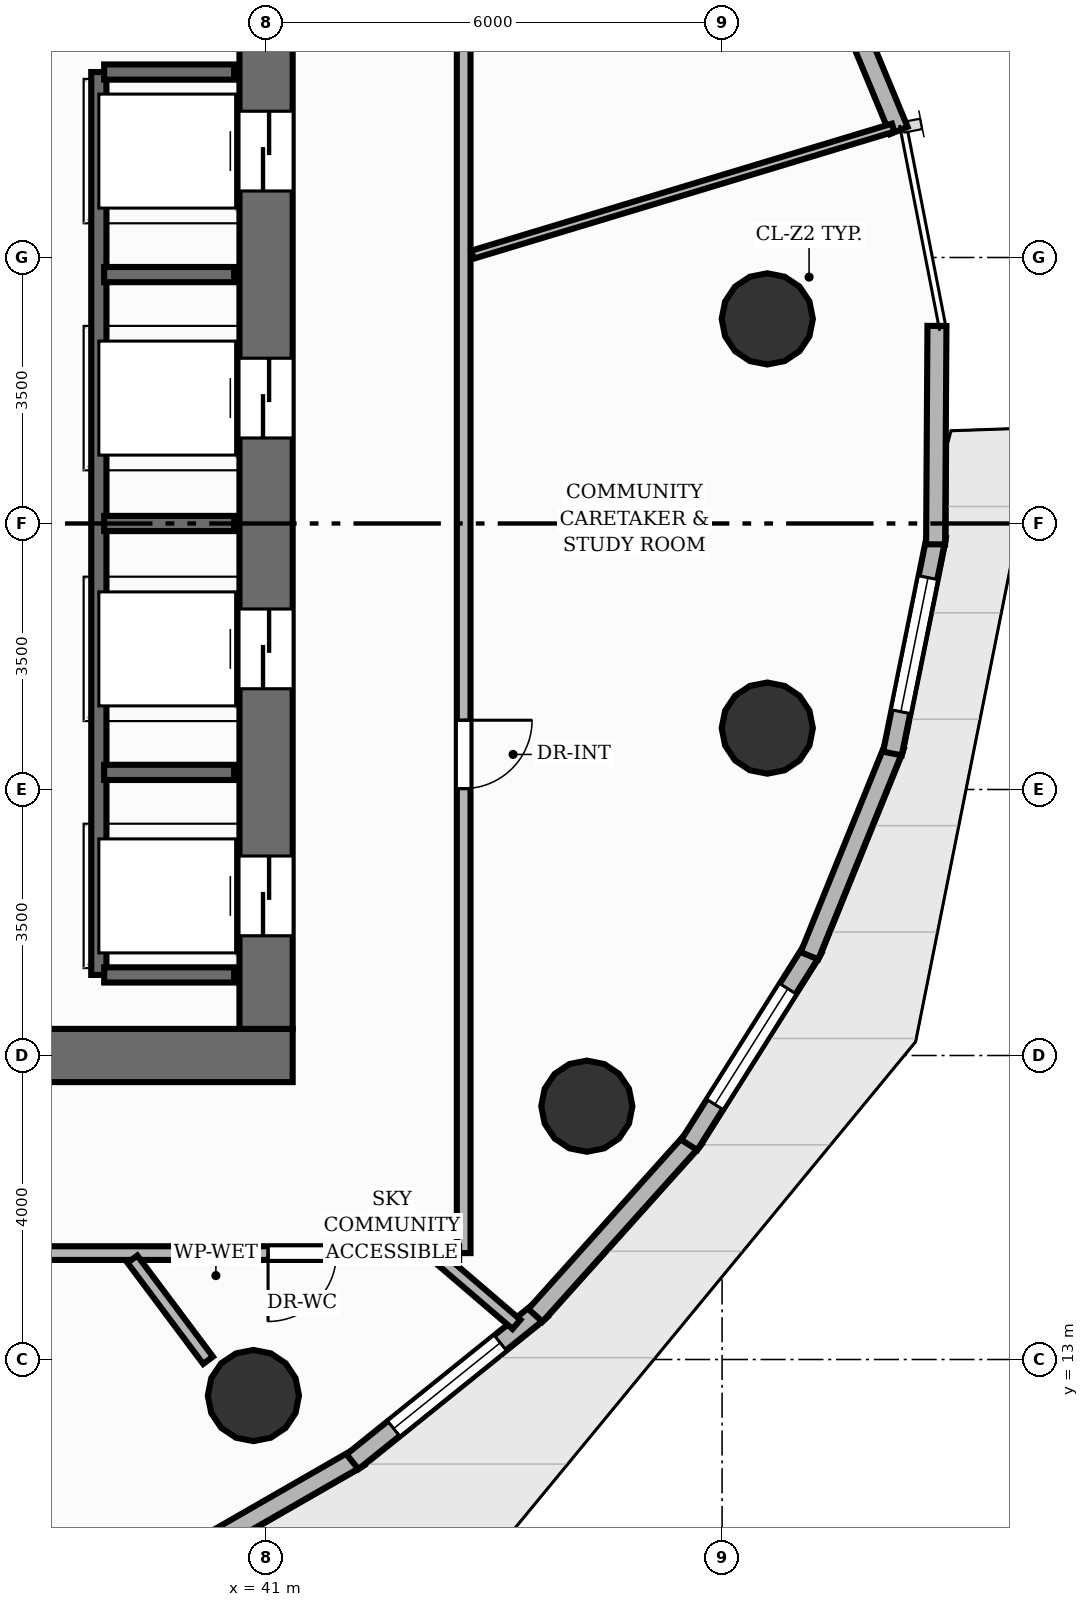
"""IFC4 building model, lengths in metres.
Left out: names, types, materials, properties, quantities, classifications, styles, units other than length and angle.
Written with IfcOpenShell. Run it as: python <this file> out.ifc"""

import sys

from ifc_helpers import new_model, si_unit, direction, frame, frame_2d, origin, origin_2d, place, context, subcontext, project, spatial, rectangle, circle, extrude, element, fill, save


model = new_model("IFC4")
c1 = context("Model", 3, precision=1e-05, world=origin(), true_north=direction((0.0, 1.0)))
c2 = subcontext(c1, "Body", "Model", "MODEL_VIEW")
j1 = project(units=[si_unit("LENGTHUNIT", "METRE"), si_unit("PLANEANGLEUNIT", "RADIAN")], contexts=[c1])
p1 = place(None, origin())
s1 = spatial("IfcSite", under=j1, at=p1, CompositionType="ELEMENT")
p2 = place(p1, origin())
s2 = spatial("IfcBuilding", under=s1, at=p2, CompositionType="ELEMENT")
p3 = place(p2, frame((0.0, 0.0, 70.88)))
s3 = spatial("IfcBuildingStorey", under=s2, at=p3, CompositionType="ELEMENT", Elevation=70.88)
p4 = place(p3, frame((22.65, 17.0, 0.0), z_axis=(0.0, 0.0, 1.0), x_axis=(1.0, 0.0, 0.0)))
e1 = element("IfcWall", 1, at=p4, inside=s3, PredefinedType="SHEAR", context=c2, shape_type="SweptSolid", body=[
    extrude(rectangle(XDim=18.7, YDim=0.7, at=frame_2d((9.35, 0.0))), origin(), (0.0, 0.0, 1.0), 3.2),
])
p5 = place(p4, frame((5.85, 0.0, 0.0)))
e2 = element("IfcOpeningElement", 2, at=p5, cuts=e1, PredefinedType="OPENING", context=c2, shape_type="SweptSolid", body=[
    extrude(rectangle(XDim=1.1, YDim=2.15, at=frame_2d((0.55, 1.075))), frame((0.0, 0.36, 0.0), z_axis=(0.0, -1.0, 0.0), x_axis=(1.0, 0.0, 0.0)), (0.0, 0.0, 1.0), 0.72),
])
p6 = place(p4, frame((9.4, 0.0, 0.0)))
e3 = element("IfcOpeningElement", 3, at=p6, cuts=e1, PredefinedType="OPENING", context=c2, shape_type="SweptSolid", body=[
    extrude(rectangle(XDim=0.9, YDim=2.1, at=frame_2d((0.45, 1.05))), frame((0.0, 0.36, 0.0), z_axis=(0.0, -1.0, 0.0), x_axis=(1.0, 0.0, 0.0)), (0.0, 0.0, 1.0), 0.72),
])
p7 = place(p3, frame((41.0, 17.35, 0.0), z_axis=(0.0, 0.0, 1.0), x_axis=(0.0, 1.0, 0.0)))
e4 = element("IfcWall", 4, at=p7, inside=s3, PredefinedType="SHEAR", context=c2, shape_type="SweptSolid", body=[
    extrude(rectangle(XDim=13.3, YDim=0.7, at=frame_2d((6.65, 0.0))), origin(), (0.0, 0.0, 1.0), 3.2),
])
p8 = place(p7, frame((1.225, 0.0, 0.0)))
e5 = element("IfcOpeningElement", 5, at=p8, cuts=e4, PredefinedType="OPENING", context=c2, shape_type="SweptSolid", body=[
    extrude(rectangle(XDim=1.05, YDim=2.15, at=frame_2d((0.525, 1.075))), frame((0.0, 0.36, 0.0), z_axis=(0.0, -1.0, 0.0), x_axis=(1.0, 0.0, 0.0)), (0.0, 0.0, 1.0), 0.72),
])
p9 = place(p7, frame((4.475, 0.0, 0.0)))
e6 = element("IfcOpeningElement", 6, at=p9, cuts=e4, PredefinedType="OPENING", context=c2, shape_type="SweptSolid", body=[
    extrude(rectangle(XDim=1.05, YDim=2.15, at=frame_2d((0.525, 1.075))), frame((0.0, 0.36, 0.0), z_axis=(0.0, -1.0, 0.0), x_axis=(1.0, 0.0, 0.0)), (0.0, 0.0, 1.0), 0.72),
])
p10 = place(p7, frame((7.775, 0.0, 0.0)))
e7 = element("IfcOpeningElement", 7, at=p10, cuts=e4, PredefinedType="OPENING", context=c2, shape_type="SweptSolid", body=[
    extrude(rectangle(XDim=1.05, YDim=2.15, at=frame_2d((0.525, 1.075))), frame((0.0, 0.36, 0.0), z_axis=(0.0, -1.0, 0.0), x_axis=(1.0, 0.0, 0.0)), (0.0, 0.0, 1.0), 0.72),
])
p11 = place(p7, frame((11.025, 0.0, 0.0)))
e8 = element("IfcOpeningElement", 8, at=p11, cuts=e4, PredefinedType="OPENING", context=c2, shape_type="SweptSolid", body=[
    extrude(rectangle(XDim=1.05, YDim=2.15, at=frame_2d((0.525, 1.075))), frame((0.0, 0.36, 0.0), z_axis=(0.0, -1.0, 0.0), x_axis=(1.0, 0.0, 0.0)), (0.0, 0.0, 1.0), 0.72),
])
for number, where, z_axis, x_axis in (
    (9, (47.594, 26.692, 0.0), (0.0, 0.0, 1.0), (1.0, 0.0, 0.0)),
    (10, (40.833, 12.526, 0.0), (0.0, 0.0, 1.0), (1.0, 0.0, 0.0)),
    (11, (45.22, 16.333, 0.0), (0.0, 0.0, 1.0), (1.0, 0.0, 0.0)),
    (12, (47.594, 21.308, 0.0), (0.0, 0.0, 1.0), (1.0, 0.0, 0.0)),
):
    element("IfcColumn", number, at=place(p3, frame(where, z_axis=z_axis, x_axis=x_axis)), inside=s3, PredefinedType="COLUMN", context=c2, shape_type="SweptSolid", body=[
        extrude(circle(Radius=0.6, at=origin_2d()), origin(), (0.0, 0.0, 1.0), 3.2),
    ])
p12 = place(p3, frame((48.233, 31.801, 0.0), z_axis=(0.0, 0.0, 1.0), x_axis=(0.383525326811, -0.923530358838, 0.0)))
e13 = element("IfcWall", 13, at=p12, inside=s3, PredefinedType="SOLIDWALL", context=c2, shape_type="SweptSolid", body=[
    extrude(rectangle(XDim=2.847, YDim=0.25, at=frame_2d((1.424, 0.0))), origin(), (0.0, 0.0, 1.0), 2.96),
])
p13 = place(p3, frame((42.227, 11.717, 0.0), z_axis=(0.0, 0.0, 1.0), x_axis=(-0.866935640597, -0.498420098975, 0.0)))
e14 = element("IfcWall", 14, at=p13, inside=s3, PredefinedType="SOLIDWALL", context=c2, shape_type="SweptSolid", body=[
    extrude(rectangle(XDim=3.236, YDim=0.25, at=frame_2d((1.618, 0.0))), origin(), (0.0, 0.0, 1.0), 2.96),
])
p14 = place(p3, frame((44.623, 13.656, 0.0), z_axis=(0.0, 0.0, 1.0), x_axis=(-0.778932404301, -0.627107893054, 0.0)))
e15 = element("IfcWall", 15, at=p14, inside=s3, PredefinedType="SOLIDWALL", context=c2, shape_type="SweptSolid", body=[
    extrude(rectangle(XDim=3.192, YDim=0.25, at=frame_2d((1.596, 0.0))), origin(), (0.0, 0.0, 1.0), 2.96),
])
p15 = place(p14, frame((0.696, 0.0, 0.85)))
e16 = element("IfcOpeningElement", 16, at=p15, cuts=e15, PredefinedType="OPENING", context=c2, shape_type="SweptSolid", body=[
    extrude(rectangle(XDim=1.8, YDim=2.0, at=frame_2d((0.9, 1.0))), frame((0.0, 0.135, 0.0), z_axis=(0.0, -1.0, 0.0), x_axis=(1.0, 0.0, 0.0)), (0.0, 0.0, 1.0), 0.27),
])
p16 = place(p3, frame((46.635, 15.911, 0.0), z_axis=(0.0, 0.0, 1.0), x_axis=(-0.66790863438, -0.744243277511, 0.0)))
e17 = element("IfcWall", 17, at=p16, inside=s3, PredefinedType="SOLIDWALL", context=c2, shape_type="SweptSolid", body=[
    extrude(rectangle(XDim=3.131, YDim=0.25, at=frame_2d((1.565, 0.0))), origin(), (0.0, 0.0, 1.0), 2.96),
])
p17 = place(p3, frame((48.201, 18.412, 0.0), z_axis=(0.0, 0.0, 1.0), x_axis=(-0.533407635949, -0.845858317871, 0.0)))
e18 = element("IfcWall", 18, at=p17, inside=s3, PredefinedType="SOLIDWALL", context=c2, shape_type="SweptSolid", body=[
    extrude(rectangle(XDim=3.061, YDim=0.25, at=frame_2d((1.53, 0.0))), origin(), (0.0, 0.0, 1.0), 2.96),
])
p18 = place(p17, frame((0.63, 0.0, 0.85)))
e19 = element("IfcOpeningElement", 19, at=p18, cuts=e18, PredefinedType="OPENING", context=c2, shape_type="SweptSolid", body=[
    extrude(rectangle(XDim=1.8, YDim=2.0, at=frame_2d((0.9, 1.0))), frame((0.0, 0.135, 0.0), z_axis=(0.0, -1.0, 0.0), x_axis=(1.0, 0.0, 0.0)), (0.0, 0.0, 1.0), 0.27),
])
p19 = place(p3, frame((49.273, 21.082, 0.0), z_axis=(0.0, 0.0, 1.0), x_axis=(-0.376048320415, -0.926600054345, 0.0)))
e20 = element("IfcWall", 20, at=p19, inside=s3, PredefinedType="SOLIDWALL", context=c2, shape_type="SweptSolid", body=[
    extrude(rectangle(XDim=2.988, YDim=0.25, at=frame_2d((1.494, 0.0))), origin(), (0.0, 0.0, 1.0), 2.96),
])
p20 = place(p3, frame((49.821, 23.839, 0.0), z_axis=(0.0, 0.0, 1.0), x_axis=(-0.198331811595, -0.980134935868, 0.0)))
e21 = element("IfcWall", 21, at=p20, inside=s3, PredefinedType="SOLIDWALL", context=c2, shape_type="SweptSolid", body=[
    extrude(rectangle(XDim=2.924, YDim=0.25, at=frame_2d((1.462, 0.0))), origin(), (0.0, 0.0, 1.0), 2.96),
])
p21 = place(p20, frame((0.562, 0.0, 0.85)))
e22 = element("IfcOpeningElement", 22, at=p21, cuts=e21, PredefinedType="OPENING", context=c2, shape_type="SweptSolid", body=[
    extrude(rectangle(XDim=1.8, YDim=2.0, at=frame_2d((0.9, 1.0))), frame((0.0, 0.135, 0.0), z_axis=(0.0, -1.0, 0.0), x_axis=(1.0, 0.0, 0.0)), (0.0, 0.0, 1.0), 0.27),
])
p22 = place(p3, frame((49.827, 26.6, 0.0), z_axis=(0.0, 0.0, 1.0), x_axis=(-0.006201036057, -0.999980773391, 0.0)))
e23 = element("IfcWall", 23, at=p22, inside=s3, PredefinedType="SOLIDWALL", context=c2, shape_type="SweptSolid", body=[
    extrude(rectangle(XDim=2.874, YDim=0.25, at=frame_2d((1.437, 0.0))), origin(), (0.0, 0.0, 1.0), 2.96),
])
p23 = place(p3, frame((38.8, 18.06, 0.0), z_axis=(0.0, 0.0, 1.0), x_axis=(0.0, 1.0, 0.0)))
e24 = element("IfcWall", 24, at=p23, inside=s3, PredefinedType="SHEAR", context=c2, shape_type="SweptSolid", body=[
    extrude(rectangle(XDim=11.88, YDim=0.2, at=frame_2d((5.94, 0.0))), origin(), (0.0, 0.0, 1.0), 3.2),
])
for number, where, z_axis, x_axis in (
    (25, (38.87, 18.06, 0.0), (0.0, 0.0, 1.0), (1.0, 0.0, 0.0)),
    (26, (38.87, 29.94, 0.0), (0.0, 0.0, 1.0), (1.0, 0.0, 0.0)),
    (27, (38.87, 20.725, 0.0), (0.0, 0.0, 1.0), (1.0, 0.0, 0.0)),
    (28, (38.87, 24.0, 0.0), (0.0, 0.0, 1.0), (1.0, 0.0, 0.0)),
    (29, (38.87, 27.275, 0.0), (0.0, 0.0, 1.0), (1.0, 0.0, 0.0)),
):
    element("IfcWall", number, at=place(p3, frame(where, z_axis=z_axis, x_axis=x_axis)), inside=s3, PredefinedType="SHEAR", context=c2, shape_type="SweptSolid", body=[
        extrude(rectangle(XDim=1.71, YDim=0.2, at=frame_2d((0.855, 0.0))), origin(), (0.0, 0.0, 1.0), 3.2),
    ])
p24 = place(p3, frame((43.6, 33.54, 0.0), z_axis=(0.0, 0.0, 1.0), x_axis=(0.0, -1.0, 0.0)))
e30 = element("IfcWall", 30, at=p24, inside=s3, PredefinedType="PARTITIONING", context=c2, shape_type="SweptSolid", body=[
    extrude(rectangle(XDim=19.14, YDim=0.18, at=frame_2d((9.57, 0.0))), origin(), (0.0, 0.0, 1.0), 2.955),
])
p25 = place(p24, frame((12.128, 0.0, 0.0)))
e31 = element("IfcOpeningElement", 31, at=p25, cuts=e30, PredefinedType="OPENING", context=c2, shape_type="SweptSolid", body=[
    extrude(rectangle(XDim=0.9, YDim=2.1, at=frame_2d((0.45, 1.05))), frame((0.0, 0.1, 0.0), z_axis=(0.0, -1.0, 0.0), x_axis=(1.0, 0.0, 0.0)), (0.0, 0.0, 1.0), 0.2),
])
p26 = place(p3, frame((43.231, 14.4, 0.0), z_axis=(0.0, 0.0, 1.0), x_axis=(-1.0, 0.0, 0.0)))
e32 = element("IfcWall", 32, at=p26, inside=s3, PredefinedType="PARTITIONING", context=c2, shape_type="SweptSolid", body=[
    extrude(rectangle(XDim=22.771, YDim=0.18, at=frame_2d((11.386, 0.0))), origin(), (0.0, 0.0, 1.0), 2.955),
])
p27 = place(p26, frame((10.968, 0.0, 0.0)))
e33 = element("IfcOpeningElement", 33, at=p27, cuts=e32, PredefinedType="OPENING", context=c2, shape_type="SweptSolid", body=[
    extrude(rectangle(XDim=0.9, YDim=2.1, at=frame_2d((0.45, 1.05))), frame((0.0, 0.1, 0.0), z_axis=(0.0, -1.0, 0.0), x_axis=(1.0, 0.0, 0.0)), (0.0, 0.0, 1.0), 0.2),
])
p28 = place(p26, frame((1.305, 0.0, 0.0)))
e34 = element("IfcOpeningElement", 34, at=p28, cuts=e32, PredefinedType="OPENING", context=c2, shape_type="SweptSolid", body=[
    extrude(rectangle(XDim=0.9, YDim=2.1, at=frame_2d((0.45, 1.05))), frame((0.0, 0.1, 0.0), z_axis=(0.0, -1.0, 0.0), x_axis=(1.0, 0.0, 0.0)), (0.0, 0.0, 1.0), 0.2),
])
p29 = place(p3, frame((43.54, 14.4, 0.0), z_axis=(0.0, 0.0, 1.0), x_axis=(-1.0, 0.0, 0.0)))
e35 = element("IfcWall", 35, at=p29, inside=s3, PredefinedType="PARTITIONING", context=c2, shape_type="SweptSolid", body=[
    extrude(rectangle(XDim=0.36, YDim=0.18, at=frame_2d((0.18, 0.0))), origin(), (0.0, 0.0, 1.0), 2.955),
])
p30 = place(p3, frame((49.25, 29.208, 0.0), z_axis=(0.0, 0.0, 1.0), x_axis=(-0.957320436523, -0.289028686838, 0.0)))
e36 = element("IfcWall", 36, at=p30, inside=s3, PredefinedType="MOVABLE", context=c2, shape_type="SweptSolid", body=[
    extrude(rectangle(XDim=5.782, YDim=0.11, at=frame_2d((2.891, 0.0))), origin(), (0.0, 0.0, 1.0), 2.642),
])
p31 = place(p3, frame((39.242, 14.32, 0.0), z_axis=(0.0, 0.0, 1.0), x_axis=(0.599082687588, -0.800687163274, 0.0)))
e37 = element("IfcWall", 37, at=p31, inside=s3, PredefinedType="PLUMBINGWALL", context=c2, shape_type="SweptSolid", body=[
    extrude(rectangle(XDim=1.661, YDim=0.16, at=frame_2d((0.831, 0.0))), origin(), (0.0, 0.0, 1.0), 2.261),
])
p32 = place(p3, frame((44.294, 13.462, 0.0), z_axis=(0.0, 0.0, 1.0), x_axis=(-0.75928230748, 0.650761382957, 0.0)))
e38 = element("IfcWall", 38, at=p32, inside=s3, PredefinedType="PLUMBINGWALL", context=c2, shape_type="SweptSolid", body=[
    extrude(rectangle(XDim=1.341, YDim=0.16, at=frame_2d((0.67, 0.0))), origin(), (0.0, 0.0, 1.0), 2.955),
])
p33 = place(p15, origin())
e39 = element("IfcWindow", 39, at=p33, inside=s3, PartitioningType="SINGLE_PANEL", PredefinedType="WINDOW", context=c2, shape_type="SweptSolid", body=[
    extrude(rectangle(XDim=1.8, YDim=2.0, at=frame_2d((0.9, 1.0))), frame((0.0, 0.03, 0.0), z_axis=(0.0, -1.0, 0.0), x_axis=(1.0, 0.0, 0.0)), (0.0, 0.0, 1.0), 0.06),
])
fill(e16, e39)
p34 = place(p18, origin())
e40 = element("IfcWindow", 40, at=p34, inside=s3, PartitioningType="SINGLE_PANEL", PredefinedType="WINDOW", context=c2, shape_type="SweptSolid", body=[
    extrude(rectangle(XDim=1.8, YDim=2.0, at=frame_2d((0.9, 1.0))), frame((0.0, 0.03, 0.0), z_axis=(0.0, -1.0, 0.0), x_axis=(1.0, 0.0, 0.0)), (0.0, 0.0, 1.0), 0.06),
])
fill(e19, e40)
p35 = place(p21, origin())
e41 = element("IfcWindow", 41, at=p35, inside=s3, PartitioningType="SINGLE_PANEL", PredefinedType="WINDOW", context=c2, shape_type="SweptSolid", body=[
    extrude(rectangle(XDim=1.8, YDim=2.0, at=frame_2d((0.9, 1.0))), frame((0.0, 0.03, 0.0), z_axis=(0.0, -1.0, 0.0), x_axis=(1.0, 0.0, 0.0)), (0.0, 0.0, 1.0), 0.06),
])
fill(e22, e41)
p36 = place(p8, origin())
e42 = element("IfcDoor", 42, at=p36, inside=s3, OperationType="DOUBLE_DOOR_SLIDING", PredefinedType="DOOR", context=c2, shape_type="SweptSolid", body=[
    extrude(rectangle(XDim=1.05, YDim=2.15, at=frame_2d((0.525, 1.075))), frame((0.0, 0.025, 0.0), z_axis=(0.0, -1.0, 0.0), x_axis=(1.0, 0.0, 0.0)), (0.0, 0.0, 1.0), 0.05),
])
fill(e5, e42)
p37 = place(p9, origin())
e43 = element("IfcDoor", 43, at=p37, inside=s3, OperationType="DOUBLE_DOOR_SLIDING", PredefinedType="DOOR", context=c2, shape_type="SweptSolid", body=[
    extrude(rectangle(XDim=1.05, YDim=2.15, at=frame_2d((0.525, 1.075))), frame((0.0, 0.025, 0.0), z_axis=(0.0, -1.0, 0.0), x_axis=(1.0, 0.0, 0.0)), (0.0, 0.0, 1.0), 0.05),
])
fill(e6, e43)
p38 = place(p10, origin())
e44 = element("IfcDoor", 44, at=p38, inside=s3, OperationType="DOUBLE_DOOR_SLIDING", PredefinedType="DOOR", context=c2, shape_type="SweptSolid", body=[
    extrude(rectangle(XDim=1.05, YDim=2.15, at=frame_2d((0.525, 1.075))), frame((0.0, 0.025, 0.0), z_axis=(0.0, -1.0, 0.0), x_axis=(1.0, 0.0, 0.0)), (0.0, 0.0, 1.0), 0.05),
])
fill(e7, e44)
p39 = place(p11, origin())
e45 = element("IfcDoor", 45, at=p39, inside=s3, OperationType="DOUBLE_DOOR_SLIDING", PredefinedType="DOOR", context=c2, shape_type="SweptSolid", body=[
    extrude(rectangle(XDim=1.05, YDim=2.15, at=frame_2d((0.525, 1.075))), frame((0.0, 0.025, 0.0), z_axis=(0.0, -1.0, 0.0), x_axis=(1.0, 0.0, 0.0)), (0.0, 0.0, 1.0), 0.05),
])
fill(e8, e45)
p40 = place(p25, origin())
e46 = element("IfcDoor", 46, at=p40, inside=s3, OperationType="SINGLE_SWING_LEFT", PredefinedType="DOOR", context=c2, shape_type="SweptSolid", body=[
    extrude(rectangle(XDim=0.9, YDim=2.1, at=frame_2d((0.45, 1.05))), frame((0.0, 0.025, 0.0), z_axis=(0.0, -1.0, 0.0), x_axis=(1.0, 0.0, 0.0)), (0.0, 0.0, 1.0), 0.05),
])
fill(e31, e46)
p41 = place(p28, origin())
e47 = element("IfcDoor", 47, at=p41, inside=s3, OperationType="SINGLE_SWING_RIGHT", PredefinedType="DOOR", context=c2, shape_type="SweptSolid", body=[
    extrude(rectangle(XDim=0.9, YDim=2.1, at=frame_2d((0.45, 1.05))), frame((0.0, 0.025, 0.0), z_axis=(0.0, -1.0, 0.0), x_axis=(1.0, 0.0, 0.0)), (0.0, 0.0, 1.0), 0.05),
])
fill(e34, e47)
save(model, sys.argv[1])
